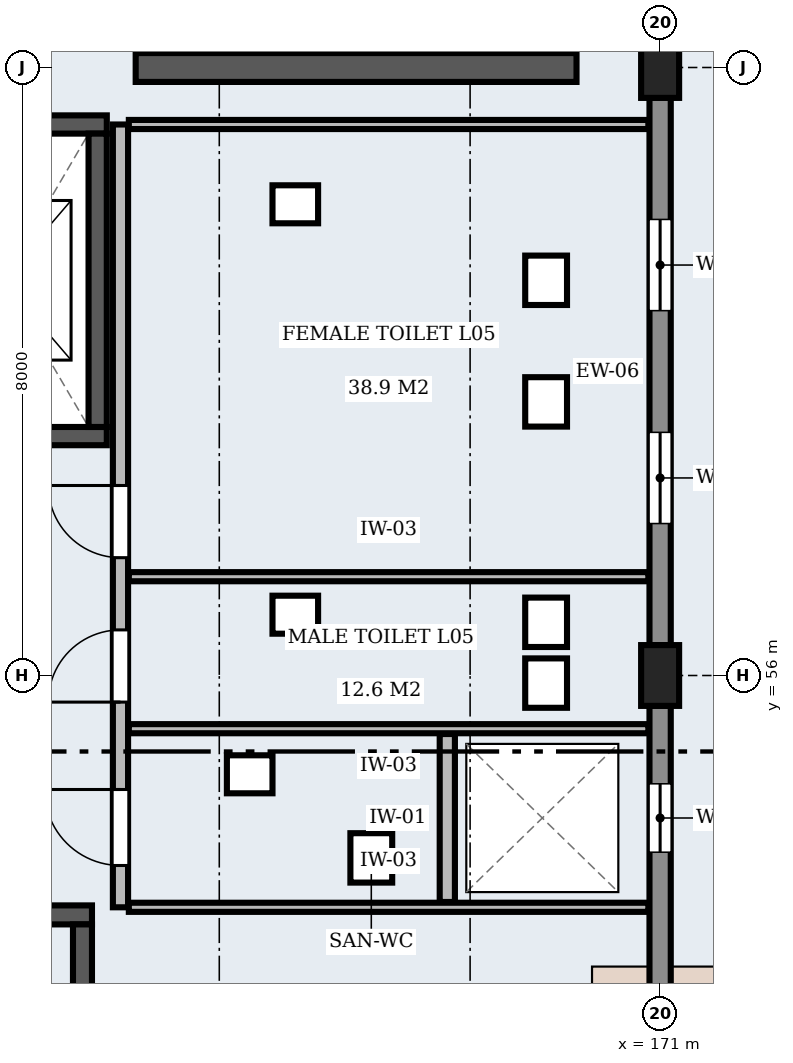
"""IFC4 building model, lengths in metres.
Left out: names, types, materials, properties, quantities, classifications, styles, units other than length and angle.
Written with IfcOpenShell. Run it as: python <this file> out.ifc"""

import sys

from ifc_helpers import new_model, si_unit, direction, frame, frame_2d, origin, origin_2d, place, context, subcontext, project, spatial, rectangle, extrude, element, fill, save


model = new_model("IFC4")
c1 = context("Model", 3, precision=1e-05, world=origin(), true_north=direction((0.0, 1.0)))
c2 = subcontext(c1, "Body", "Model", "MODEL_VIEW")
j1 = project(units=[si_unit("LENGTHUNIT", "METRE"), si_unit("PLANEANGLEUNIT", "RADIAN")], contexts=[c1])
p1 = place(None, origin())
s1 = spatial("IfcSite", under=j1, at=p1, CompositionType="ELEMENT")
p2 = place(p1, origin())
s2 = spatial("IfcBuilding", under=s1, at=p2, CompositionType="ELEMENT")
p3 = place(p2, frame((0.0, 0.0, 22.8)))
s3 = spatial("IfcBuildingStorey", under=s2, at=p3, CompositionType="ELEMENT", Elevation=22.8)
for number, where, z_axis, x_axis in (
    (1, (171.0, 56.0, 0.0), (0.0, 0.0, 1.0), (1.0, 0.0, 0.0)),
    (2, (171.0, 64.0, 0.0), (0.0, 0.0, 1.0), (1.0, 0.0, 0.0)),
):
    element("IfcColumn", number, at=place(p3, frame(where, z_axis=z_axis, x_axis=x_axis)), inside=s3, PredefinedType="COLUMN", context=c2, shape_type="SweptSolid", body=[
        extrude(rectangle(XDim=0.5, YDim=0.8, at=origin_2d()), origin(), (0.0, 0.0, 1.0), 4.2),
    ])
p4 = place(p3, frame((171.0, 63.602, 0.0), z_axis=(0.0, 0.0, 1.0), x_axis=(0.0, -1.0, 0.0)))
e3 = element("IfcWall", 3, at=p4, inside=s3, PredefinedType="STANDARD", context=c2, shape_type="SweptSolid", body=[
    extrude(rectangle(XDim=7.204, YDim=0.28, at=frame_2d((3.602, 0.0))), origin(), (0.0, 0.0, 1.0), 3.42),
])
p5 = place(p4, frame((1.601, 0.0, 0.9)))
e4 = element("IfcOpeningElement", 4, at=p5, cuts=e3, PredefinedType="OPENING", context=c2, shape_type="SweptSolid", body=[
    extrude(rectangle(XDim=1.2, YDim=1.8, at=frame_2d((0.6, 0.9))), frame((0.0, 0.152, 0.0), z_axis=(0.0, -1.0, 0.0), x_axis=(1.0, 0.0, 0.0)), (0.0, 0.0, 1.0), 0.304),
])
p6 = place(p4, frame((4.403, 0.0, 0.9)))
e5 = element("IfcOpeningElement", 5, at=p6, cuts=e3, PredefinedType="OPENING", context=c2, shape_type="SweptSolid", body=[
    extrude(rectangle(XDim=1.2, YDim=1.8, at=frame_2d((0.6, 0.9))), frame((0.0, 0.152, 0.0), z_axis=(0.0, -1.0, 0.0), x_axis=(1.0, 0.0, 0.0)), (0.0, 0.0, 1.0), 0.304),
])
p7 = place(p3, frame((171.0, 55.602, 0.0), z_axis=(0.0, 0.0, 1.0), x_axis=(0.0, -1.0, 0.0)))
e6 = element("IfcWall", 6, at=p7, inside=s3, PredefinedType="STANDARD", context=c2, shape_type="SweptSolid", body=[
    extrude(rectangle(XDim=7.204, YDim=0.28, at=frame_2d((3.602, 0.0))), origin(), (0.0, 0.0, 1.0), 3.37),
])
p8 = place(p7, frame((1.027, 0.0, 0.9)))
e7 = element("IfcOpeningElement", 7, at=p8, cuts=e6, PredefinedType="OPENING", context=c2, shape_type="SweptSolid", body=[
    extrude(rectangle(XDim=0.9, YDim=2.2, at=frame_2d((0.45, 1.1))), frame((0.0, 0.152, 0.0), z_axis=(0.0, -1.0, 0.0), x_axis=(1.0, 0.0, 0.0)), (0.0, 0.0, 1.0), 0.304),
])
p9 = place(p7, frame((4.503, 0.0, 0.9)))
e8 = element("IfcOpeningElement", 8, at=p9, cuts=e6, PredefinedType="OPENING", context=c2, shape_type="SweptSolid", body=[
    extrude(rectangle(XDim=0.9, YDim=2.2, at=frame_2d((0.45, 1.1))), frame((0.0, 0.152, 0.0), z_axis=(0.0, -1.0, 0.0), x_axis=(1.0, 0.0, 0.0)), (0.0, 0.0, 1.0), 0.304),
])
p10 = place(p3, frame((163.525, 52.85, 0.0), z_axis=(0.0, 0.0, 1.0), x_axis=(-1.0, 0.0, 0.0)))
e9 = element("IfcWall", 9, at=p10, inside=s3, PredefinedType="SHEAR", context=c2, shape_type="SweptSolid", body=[
    extrude(rectangle(XDim=9.65, YDim=0.25, at=frame_2d((4.825, 0.0))), origin(), (0.0, 0.0, 1.0), 3.89),
])
p11 = place(p10, frame((7.925, 0.0, 0.0)))
e10 = element("IfcOpeningElement", 10, at=p11, cuts=e9, PredefinedType="OPENING", context=c2, shape_type="SweptSolid", body=[
    extrude(rectangle(XDim=1.25, YDim=2.15, at=frame_2d((0.625, 1.075))), frame((0.0, 0.137, 0.0), z_axis=(0.0, -1.0, 0.0), x_axis=(1.0, 0.0, 0.0)), (0.0, 0.0, 1.0), 0.274),
])
p12 = place(p3, frame((163.4, 48.875, 0.0), z_axis=(0.0, 0.0, 1.0), x_axis=(0.0, 1.0, 0.0)))
e11 = element("IfcWall", 11, at=p12, inside=s3, PredefinedType="SHEAR", context=c2, shape_type="SweptSolid", body=[
    extrude(rectangle(XDim=3.85, YDim=0.25, at=frame_2d((1.925, 0.0))), origin(), (0.0, 0.0, 1.0), 3.89),
])
p13 = place(p3, frame((160.975, 59.15, 0.0), z_axis=(0.0, 0.0, 1.0), x_axis=(1.0, 0.0, 0.0)))
e12 = element("IfcWall", 12, at=p13, inside=s3, PredefinedType="SHEAR", context=c2, shape_type="SweptSolid", body=[
    extrude(rectangle(XDim=2.745, YDim=0.24, at=frame_2d((1.373, 0.0))), origin(), (0.0, 0.0, 1.0), 3.89),
])
p14 = place(p13, frame((0.825, 0.0, 0.0)))
e13 = element("IfcOpeningElement", 13, at=p14, cuts=e12, PredefinedType="OPENING", context=c2, shape_type="SweptSolid", body=[
    extrude(rectangle(XDim=1.1, YDim=2.2, at=frame_2d((0.55, 1.1))), frame((0.0, 0.132, 0.0), z_axis=(0.0, -1.0, 0.0), x_axis=(1.0, 0.0, 0.0)), (0.0, 0.0, 1.0), 0.264),
])
p15 = place(p3, frame((163.72, 63.25, 0.0), z_axis=(0.0, 0.0, 1.0), x_axis=(-1.0, 0.0, 0.0)))
e14 = element("IfcWall", 14, at=p15, inside=s3, PredefinedType="SHEAR", context=c2, shape_type="SweptSolid", body=[
    extrude(rectangle(XDim=2.745, YDim=0.24, at=frame_2d((1.373, 0.0))), origin(), (0.0, 0.0, 1.0), 3.89),
])
p16 = place(p3, frame((163.6, 59.27, 0.0), z_axis=(0.0, 0.0, 1.0), x_axis=(0.0, 1.0, 0.0)))
e15 = element("IfcWall", 15, at=p16, inside=s3, PredefinedType="SHEAR", context=c2, shape_type="SweptSolid", body=[
    extrude(rectangle(XDim=3.86, YDim=0.24, at=frame_2d((1.93, 0.0))), origin(), (0.0, 0.0, 1.0), 3.89),
])
p17 = place(p3, frame((164.1, 64.0, 0.0), z_axis=(0.0, 0.0, 1.0), x_axis=(1.0, 0.0, 0.0)))
e16 = element("IfcWall", 16, at=p17, inside=s3, PredefinedType="SHEAR", context=c2, shape_type="SweptSolid", body=[
    extrude(rectangle(XDim=5.8, YDim=0.38, at=frame_2d((2.9, 0.0))), origin(), (0.0, 0.0, 1.0), 2.94),
])
p18 = place(p3, frame((163.9, 52.95, 0.0), z_axis=(0.0, 0.0, 1.0), x_axis=(0.0, 1.0, 0.0)))
e17 = element("IfcWall", 17, at=p18, inside=s3, PredefinedType="STANDARD", context=c2, shape_type="SweptSolid", body=[
    extrude(rectangle(XDim=10.3, YDim=0.2, at=frame_2d((5.15, 0.0))), origin(), (0.0, 0.0, 1.0), 3.89),
])
p19 = place(p18, frame((0.55, 0.0, 0.0)))
e18 = element("IfcOpeningElement", 18, at=p19, cuts=e17, PredefinedType="OPENING", context=c2, shape_type="SweptSolid", body=[
    extrude(rectangle(XDim=1.0, YDim=2.1, at=frame_2d((0.5, 1.05))), frame((0.0, 0.112, 0.0), z_axis=(0.0, -1.0, 0.0), x_axis=(1.0, 0.0, 0.0)), (0.0, 0.0, 1.0), 0.224),
])
p20 = place(p18, frame((2.7, 0.0, 0.0)))
e19 = element("IfcOpeningElement", 19, at=p20, cuts=e17, PredefinedType="OPENING", context=c2, shape_type="SweptSolid", body=[
    extrude(rectangle(XDim=0.95, YDim=2.1, at=frame_2d((0.475, 1.05))), frame((0.0, 0.112, 0.0), z_axis=(0.0, -1.0, 0.0), x_axis=(1.0, 0.0, 0.0)), (0.0, 0.0, 1.0), 0.224),
])
p21 = place(p18, frame((4.6, 0.0, 0.0)))
e20 = element("IfcOpeningElement", 20, at=p21, cuts=e17, PredefinedType="OPENING", context=c2, shape_type="SweptSolid", body=[
    extrude(rectangle(XDim=0.95, YDim=2.1, at=frame_2d((0.475, 1.05))), frame((0.0, 0.112, 0.0), z_axis=(0.0, -1.0, 0.0), x_axis=(1.0, 0.0, 0.0)), (0.0, 0.0, 1.0), 0.224),
])
p22 = place(p3, frame((168.2, 53.02, 0.0), z_axis=(0.0, 0.0, 1.0), x_axis=(0.0, 1.0, 0.0)))
e21 = element("IfcWall", 21, at=p22, inside=s3, PredefinedType="STANDARD", context=c2, shape_type="SweptSolid", body=[
    extrude(rectangle(XDim=2.21, YDim=0.2, at=frame_2d((1.105, 0.0))), origin(), (0.0, 0.0, 1.0), 3.89),
])
for number, where, z_axis, x_axis in (
    (22, (164.01, 52.95, 0.0), (0.0, 0.0, 1.0), (1.0, 0.0, 0.0)),
    (23, (164.01, 55.3, 0.0), (0.0, 0.0, 1.0), (1.0, 0.0, 0.0)),
    (24, (164.01, 57.3, 0.0), (0.0, 0.0, 1.0), (1.0, 0.0, 0.0)),
    (25, (164.01, 63.25, 0.0), (0.0, 0.0, 1.0), (1.0, 0.0, 0.0)),
):
    element("IfcWall", number, at=place(p3, frame(where, z_axis=z_axis, x_axis=x_axis)), inside=s3, PredefinedType="STANDARD", context=c2, shape_type="SweptSolid", body=[
        extrude(rectangle(XDim=6.835, YDim=0.12, at=frame_2d((3.417, 0.0))), origin(), (0.0, 0.0, 1.0), 3.89),
    ])
p23 = place(p5, origin())
e26 = element("IfcWindow", 26, at=p23, inside=s3, PartitioningType="SINGLE_PANEL", PredefinedType="WINDOW", context=c2, shape_type="SweptSolid", body=[
    extrude(rectangle(XDim=1.2, YDim=1.8, at=frame_2d((0.6, 0.9))), frame((0.0, 0.03, 0.0), z_axis=(0.0, -1.0, 0.0), x_axis=(1.0, 0.0, 0.0)), (0.0, 0.0, 1.0), 0.06),
])
fill(e4, e26)
p24 = place(p6, origin())
e27 = element("IfcWindow", 27, at=p24, inside=s3, PartitioningType="SINGLE_PANEL", PredefinedType="WINDOW", context=c2, shape_type="SweptSolid", body=[
    extrude(rectangle(XDim=1.2, YDim=1.8, at=frame_2d((0.6, 0.9))), frame((0.0, 0.03, 0.0), z_axis=(0.0, -1.0, 0.0), x_axis=(1.0, 0.0, 0.0)), (0.0, 0.0, 1.0), 0.06),
])
fill(e5, e27)
p25 = place(p8, origin())
e28 = element("IfcWindow", 28, at=p25, inside=s3, PartitioningType="SINGLE_PANEL", PredefinedType="WINDOW", context=c2, shape_type="SweptSolid", body=[
    extrude(rectangle(XDim=0.9, YDim=2.2, at=frame_2d((0.45, 1.1))), frame((0.0, 0.03, 0.0), z_axis=(0.0, -1.0, 0.0), x_axis=(1.0, 0.0, 0.0)), (0.0, 0.0, 1.0), 0.06),
])
fill(e7, e28)
p26 = place(p19, origin())
e29 = element("IfcDoor", 29, at=p26, inside=s3, OperationType="SINGLE_SWING_RIGHT", PredefinedType="DOOR", context=c2, shape_type="SweptSolid", body=[
    extrude(rectangle(XDim=1.0, YDim=2.1, at=frame_2d((0.5, 1.05))), frame((0.0, 0.025, 0.0), z_axis=(0.0, -1.0, 0.0), x_axis=(1.0, 0.0, 0.0)), (0.0, 0.0, 1.0), 0.05),
])
fill(e18, e29)
p27 = place(p20, origin())
e30 = element("IfcDoor", 30, at=p27, inside=s3, OperationType="SINGLE_SWING_LEFT", PredefinedType="DOOR", context=c2, shape_type="SweptSolid", body=[
    extrude(rectangle(XDim=0.95, YDim=2.1, at=frame_2d((0.475, 1.05))), frame((0.0, 0.025, 0.0), z_axis=(0.0, -1.0, 0.0), x_axis=(1.0, 0.0, 0.0)), (0.0, 0.0, 1.0), 0.05),
])
fill(e19, e30)
p28 = place(p21, origin())
e31 = element("IfcDoor", 31, at=p28, inside=s3, OperationType="SINGLE_SWING_RIGHT", PredefinedType="DOOR", context=c2, shape_type="SweptSolid", body=[
    extrude(rectangle(XDim=0.95, YDim=2.1, at=frame_2d((0.475, 1.05))), frame((0.0, 0.025, 0.0), z_axis=(0.0, -1.0, 0.0), x_axis=(1.0, 0.0, 0.0)), (0.0, 0.0, 1.0), 0.05),
])
fill(e20, e31)
save(model, sys.argv[1])
